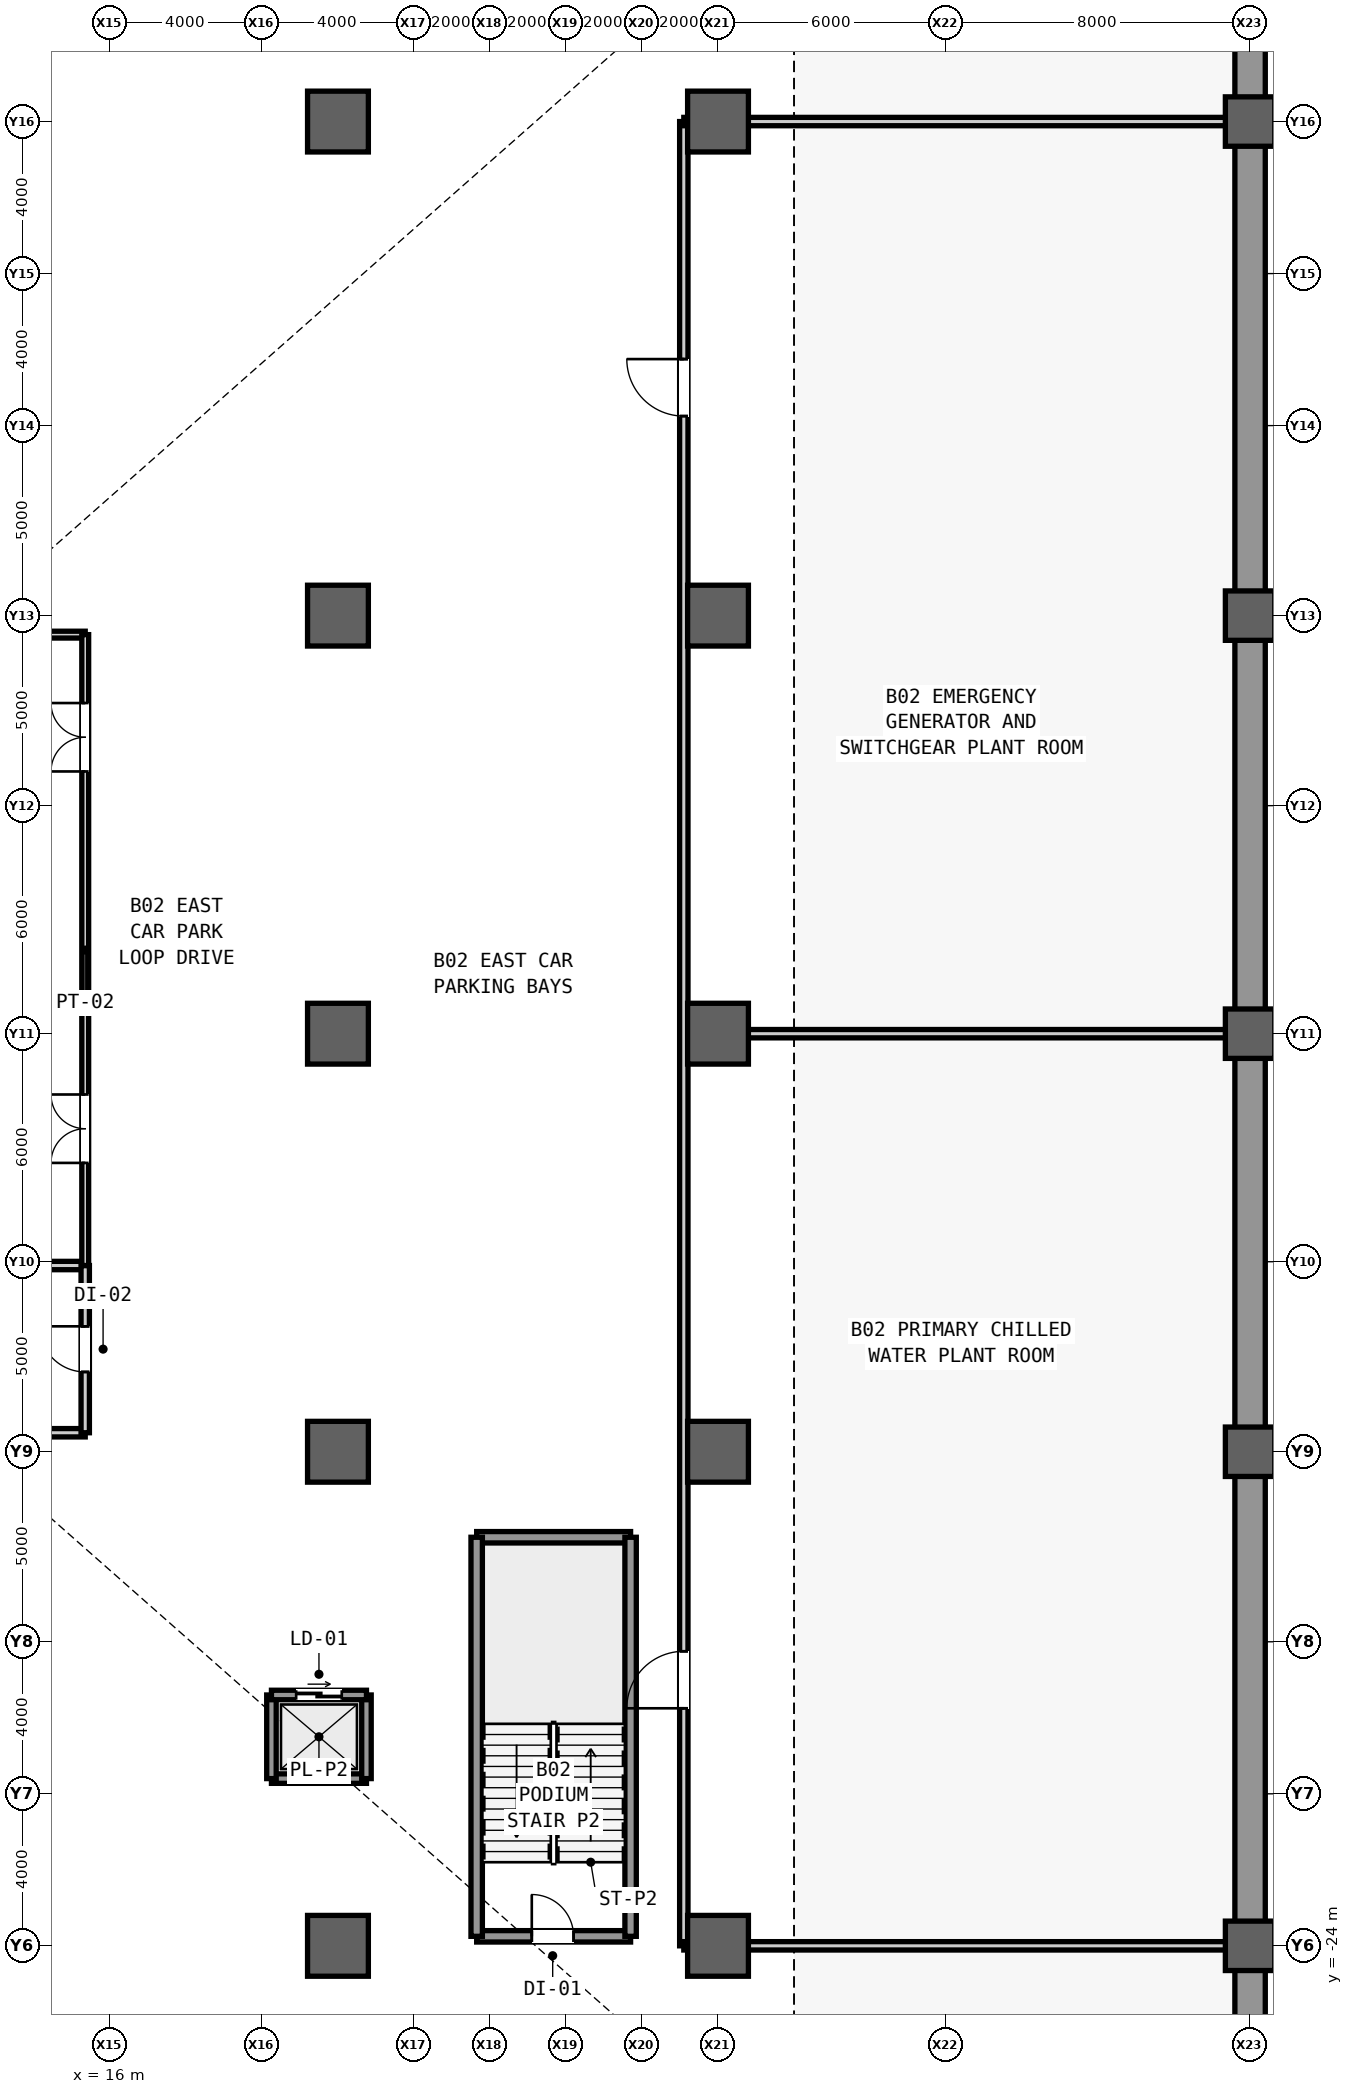
"""IFC4 building model, lengths in metres.
Left out: names, types, materials, properties, quantities, classifications, styles, units other than length and angle.
Written with IfcOpenShell. Run it as: python <this file> out.ifc"""

import sys

from ifc_helpers import new_model, si_unit, direction, frame, frame_2d, origin, origin_2d, place, context, subcontext, project, spatial, rectangle, extrude, source, transform, mapped, element, fill, save


model = new_model("IFC4")
c1 = context("Model", 3, precision=1e-05, world=origin(), true_north=direction((0.0, 1.0)))
c2 = subcontext(c1, "Body", "Model", "MODEL_VIEW")
j1 = project(units=[si_unit("LENGTHUNIT", "METRE"), si_unit("PLANEANGLEUNIT", "RADIAN")], contexts=[c1])
p1 = place(None, origin())
s1 = spatial("IfcSite", under=j1, at=p1, CompositionType="ELEMENT")
p2 = place(p1, origin())
s2 = spatial("IfcBuilding", under=s1, at=p2, CompositionType="ELEMENT")
p3 = place(p2, frame((0.0, 0.0, -9.6)))
s3 = spatial("IfcBuildingStorey", under=s2, at=p3, CompositionType="ELEMENT", Elevation=-9.6)
m1 = source(origin(), c2, "Body", "SweptSolid", [
    extrude(rectangle(XDim=74.4, YDim=0.8, at=frame_2d((37.2, 0.0))), origin(), (0.0, 0.0, 1.0), 4.48),
])
p4 = place(p3, frame((46.0, -37.2, 0.0), z_axis=(0.0, 0.0, 1.0), x_axis=(0.0, 1.0, 0.0)))
e1 = element("IfcWall", 1, at=p4, inside=s3, PredefinedType="USERDEFINED", context=c2, shape_type="MappedRepresentation", body=[
    mapped(m1, transform((0.0, 0.0, 0.0), scale=1.0)),
])
m2 = source(origin(), c2, "Body", "SweptSolid", [
    extrude(rectangle(XDim=1.6, YDim=1.6, at=origin_2d()), origin(), (0.0, 0.0, 1.0), 4.8),
])
for number, where, z_axis, x_axis in (
    (2, (22.0, -24.0, 0.0), (0.0, 0.0, 1.0), (1.0, 0.0, 0.0)),
    (3, (22.0, -11.0, 0.0), (0.0, 0.0, 1.0), (1.0, 0.0, 0.0)),
    (4, (22.0, 0.0, 0.0), (0.0, 0.0, 1.0), (1.0, 0.0, 0.0)),
    (5, (22.0, 11.0, 0.0), (0.0, 0.0, 1.0), (1.0, 0.0, 0.0)),
    (6, (22.0, 24.0, 0.0), (0.0, 0.0, 1.0), (1.0, 0.0, 0.0)),
    (7, (32.0, -24.0, 0.0), (0.0, 0.0, 1.0), (1.0, 0.0, 0.0)),
    (8, (32.0, -11.0, 0.0), (0.0, 0.0, 1.0), (1.0, 0.0, 0.0)),
    (9, (32.0, 0.0, 0.0), (0.0, 0.0, 1.0), (1.0, 0.0, 0.0)),
    (10, (32.0, 11.0, 0.0), (0.0, 0.0, 1.0), (1.0, 0.0, 0.0)),
    (11, (32.0, 24.0, 0.0), (0.0, 0.0, 1.0), (1.0, 0.0, 0.0)),
):
    element("IfcColumn", number, at=place(p3, frame(where, z_axis=z_axis, x_axis=x_axis)), inside=s3, PredefinedType="COLUMN", context=c2, shape_type="MappedRepresentation", body=[
        mapped(m2, transform((0.0, 0.0, 0.0), scale=1.0)),
    ])
m3 = source(origin(), c2, "Body", "SweptSolid", [
    extrude(rectangle(XDim=1.3, YDim=1.3, at=origin_2d()), origin(), (0.0, 0.0, 1.0), 4.8),
])
for number, where, z_axis, x_axis in (
    (12, (46.0, -24.0, 0.0), (0.0, 0.0, 1.0), (1.0, 0.0, 0.0)),
    (13, (46.0, -11.0, 0.0), (0.0, 0.0, 1.0), (1.0, 0.0, 0.0)),
    (14, (46.0, 0.0, 0.0), (0.0, 0.0, 1.0), (1.0, 0.0, 0.0)),
    (15, (46.0, 11.0, 0.0), (0.0, 0.0, 1.0), (1.0, 0.0, 0.0)),
    (16, (46.0, 24.0, 0.0), (0.0, 0.0, 1.0), (1.0, 0.0, 0.0)),
):
    element("IfcColumn", number, at=place(p3, frame(where, z_axis=z_axis, x_axis=x_axis)), inside=s3, PredefinedType="COLUMN", context=c2, shape_type="MappedRepresentation", body=[
        mapped(m3, transform((0.0, 0.0, 0.0), scale=1.0)),
    ])
m4 = source(origin(), c2, "Body", "SweptSolid", [
    extrude(rectangle(XDim=4.05, YDim=0.22, at=frame_2d((2.025, 0.0))), origin(), (0.0, 0.0, 1.0), 4.48),
])
for number, where, z_axis, x_axis in (
    (17, (11.3, -10.5, 0.0), (0.0, 0.0, 1.0), (1.0, 0.0, 0.0)),
    (18, (11.3, -6.1, 0.0), (0.0, 0.0, 1.0), (1.0, 0.0, 0.0)),
):
    element("IfcWall", number, at=place(p3, frame(where, z_axis=z_axis, x_axis=x_axis)), inside=s3, PredefinedType="PARTITIONING", context=c2, shape_type="MappedRepresentation", body=[
        mapped(m4, transform((0.0, 0.0, 0.0), scale=1.0)),
    ])
m5 = source(origin(), c2, "Body", "SweptSolid", [
    extrude(rectangle(XDim=4.4, YDim=0.22, at=frame_2d((2.2, 0.0))), origin(), (0.0, 0.0, 1.0), 4.48),
])
p5 = place(p3, frame((15.35, -10.5, 0.0), z_axis=(0.0, 0.0, 1.0), x_axis=(0.0, 1.0, 0.0)))
e19 = element("IfcWall", 19, at=p5, inside=s3, PredefinedType="PARTITIONING", context=c2, shape_type="MappedRepresentation", body=[
    mapped(m5, transform((0.0, 0.0, 0.0), scale=1.0)),
])
m6 = source(origin(), c2, "Body", "SweptSolid", [
    extrude(rectangle(XDim=1.2, YDim=2.2, at=frame_2d((0.6, 1.1))), frame((0.0, 0.12, 0.0), z_axis=(0.0, -1.0, 0.0), x_axis=(1.0, 0.0, 0.0)), (0.0, 0.0, 1.0), 0.24),
])
p6 = place(p5, frame((1.6, 0.0, 0.0)))
e20 = element("IfcOpeningElement", 20, at=p6, cuts=e19, PredefinedType="OPENING", context=c2, shape_type="MappedRepresentation", body=[
    mapped(m6, transform((0.0, 0.0, 0.0), scale=1.0)),
])
m7 = source(origin(), c2, "Body", "SweptSolid", [
    extrude(rectangle(XDim=4.05, YDim=0.18, at=frame_2d((2.025, 0.0))), origin(), (0.0, 0.0, 1.0), 4.48),
])
p7 = place(p3, frame((11.3, 10.5, 0.0), z_axis=(0.0, 0.0, 1.0), x_axis=(1.0, 0.0, 0.0)))
e21 = element("IfcWall", 21, at=p7, inside=s3, PredefinedType="PARTITIONING", context=c2, shape_type="MappedRepresentation", body=[
    mapped(m7, transform((0.0, 0.0, 0.0), scale=1.0)),
])
m8 = source(origin(), c2, "Body", "SweptSolid", [
    extrude(rectangle(XDim=16.6, YDim=0.18, at=frame_2d((8.3, 0.0))), origin(), (0.0, 0.0, 1.0), 4.48),
])
p8 = place(p3, frame((15.35, -6.1, 0.0), z_axis=(0.0, 0.0, 1.0), x_axis=(0.0, 1.0, 0.0)))
e22 = element("IfcWall", 22, at=p8, inside=s3, PredefinedType="PARTITIONING", context=c2, shape_type="MappedRepresentation", body=[
    mapped(m8, transform((0.0, 0.0, 0.0), scale=1.0)),
])
m9 = source(origin(), c2, "Body", "SweptSolid", [
    extrude(rectangle(XDim=1.8, YDim=2.25, at=frame_2d((0.9, 1.125))), frame((0.0, 0.1, 0.0), z_axis=(0.0, -1.0, 0.0), x_axis=(1.0, 0.0, 0.0)), (0.0, 0.0, 1.0), 0.2),
])
p9 = place(p8, frame((2.7, 0.0, 0.0)))
e23 = element("IfcOpeningElement", 23, at=p9, cuts=e22, PredefinedType="OPENING", context=c2, shape_type="MappedRepresentation", body=[
    mapped(m9, transform((0.0, 0.0, 0.0), scale=1.0)),
])
p10 = place(p8, frame((13.0, 0.0, 0.0)))
e24 = element("IfcOpeningElement", 24, at=p10, cuts=e22, PredefinedType="OPENING", context=c2, shape_type="MappedRepresentation", body=[
    mapped(m9, transform((0.0, 0.0, 0.0), scale=1.0)),
])
m10 = source(origin(), c2, "Body", "SweptSolid", [
    extrude(rectangle(XDim=4.05, YDim=0.3, at=frame_2d((2.025, 0.0))), origin(), (0.0, 0.0, 1.0), 4.48),
])
p11 = place(p3, frame((25.65, -23.75, 0.0), z_axis=(0.0, 0.0, 1.0), x_axis=(1.0, 0.0, 0.0)))
e25 = element("IfcWall", 25, at=p11, inside=s3, PredefinedType="SHEAR", context=c2, shape_type="MappedRepresentation", body=[
    mapped(m10, transform((0.0, 0.0, 0.0), scale=1.0)),
])
m11 = source(origin(), c2, "Body", "SweptSolid", [
    extrude(rectangle(XDim=1.1, YDim=2.2, at=frame_2d((0.55, 1.1))), frame((0.0, 0.16, 0.0), z_axis=(0.0, -1.0, 0.0), x_axis=(1.0, 0.0, 0.0)), (0.0, 0.0, 1.0), 0.32),
])
p12 = place(p11, frame((1.45, 0.0, 0.0)))
e26 = element("IfcOpeningElement", 26, at=p12, cuts=e25, PredefinedType="OPENING", context=c2, shape_type="MappedRepresentation", body=[
    mapped(m11, transform((0.0, 0.0, 0.0), scale=1.0)),
])
p13 = place(p3, frame((25.65, -13.25, 0.0), z_axis=(0.0, 0.0, 1.0), x_axis=(1.0, 0.0, 0.0)))
e27 = element("IfcWall", 27, at=p13, inside=s3, PredefinedType="SHEAR", context=c2, shape_type="MappedRepresentation", body=[
    mapped(m10, transform((0.0, 0.0, 0.0), scale=1.0)),
])
m12 = source(origin(), c2, "Body", "SweptSolid", [
    extrude(rectangle(XDim=10.5, YDim=0.3, at=frame_2d((5.25, 0.0))), origin(), (0.0, 0.0, 1.0), 4.48),
])
for number, where, z_axis, x_axis in (
    (28, (25.65, -23.75, 0.0), (0.0, 0.0, 1.0), (0.0, 1.0, 0.0)),
    (29, (29.7, -23.75, 0.0), (0.0, 0.0, 1.0), (0.0, 1.0, 0.0)),
):
    element("IfcWall", number, at=place(p3, frame(where, z_axis=z_axis, x_axis=x_axis)), inside=s3, PredefinedType="SHEAR", context=c2, shape_type="MappedRepresentation", body=[
        mapped(m12, transform((0.0, 0.0, 0.0), scale=1.0)),
    ])
m13 = source(origin(), c2, "Body", "SweptSolid", [
    extrude(rectangle(XDim=2.5, YDim=0.25, at=frame_2d((1.25, 0.0))), origin(), (0.0, 0.0, 1.0), 4.48),
])
p14 = place(p3, frame((20.25, -19.6, 0.0), z_axis=(0.0, 0.0, 1.0), x_axis=(1.0, 0.0, 0.0)))
e30 = element("IfcWall", 30, at=p14, inside=s3, PredefinedType="SHEAR", context=c2, shape_type="MappedRepresentation", body=[
    mapped(m13, transform((0.0, 0.0, 0.0), scale=1.0)),
])
m14 = source(origin(), c2, "Body", "SweptSolid", [
    extrude(rectangle(XDim=2.2, YDim=0.25, at=frame_2d((1.1, 0.0))), origin(), (0.0, 0.0, 1.0), 4.48),
])
for number, where, z_axis, x_axis in (
    (31, (20.25, -19.6, 0.0), (0.0, 0.0, 1.0), (0.0, 1.0, 0.0)),
    (32, (22.75, -19.6, 0.0), (0.0, 0.0, 1.0), (0.0, 1.0, 0.0)),
):
    element("IfcWall", number, at=place(p3, frame(where, z_axis=z_axis, x_axis=x_axis)), inside=s3, PredefinedType="SHEAR", context=c2, shape_type="MappedRepresentation", body=[
        mapped(m14, transform((0.0, 0.0, 0.0), scale=1.0)),
    ])
p15 = place(p3, frame((20.25, -17.4, 0.0), z_axis=(0.0, 0.0, 1.0), x_axis=(1.0, 0.0, 0.0)))
e33 = element("IfcWall", 33, at=p15, inside=s3, PredefinedType="SHEAR", context=c2, shape_type="MappedRepresentation", body=[
    mapped(m13, transform((0.0, 0.0, 0.0), scale=1.0)),
])
m15 = source(origin(), c2, "Body", "SweptSolid", [
    extrude(rectangle(XDim=1.2, YDim=2.3, at=frame_2d((0.6, 1.15))), frame((0.0, 0.135, 0.0), z_axis=(0.0, -1.0, 0.0), x_axis=(1.0, 0.0, 0.0)), (0.0, 0.0, 1.0), 0.27),
])
p16 = place(p15, frame((0.65, 0.0, 0.0)))
e34 = element("IfcOpeningElement", 34, at=p16, cuts=e33, PredefinedType="OPENING", context=c2, shape_type="MappedRepresentation", body=[
    mapped(m15, transform((0.0, 0.0, 0.0), scale=1.0)),
])
m16 = source(origin(), c2, "Body", "SweptSolid", [
    extrude(rectangle(XDim=14.7, YDim=0.22, at=frame_2d((7.35, 0.0))), origin(), (0.0, 0.0, 1.0), 2.68),
])
p17 = place(p3, frame((31.1, 0.0, 0.0), z_axis=(0.0, 0.0, 1.0), x_axis=(1.0, 0.0, 0.0)))
e35 = element("IfcWall", 35, at=p17, inside=s3, PredefinedType="PARTITIONING", context=c2, shape_type="MappedRepresentation", body=[
    mapped(m16, transform((0.0, 0.0, 0.0), scale=1.0)),
])
m17 = source(origin(), c2, "Body", "SweptSolid", [
    extrude(rectangle(XDim=48.0, YDim=0.22, at=frame_2d((24.0, 0.0))), origin(), (0.0, 0.0, 1.0), 4.48),
])
p18 = place(p3, frame((31.1, -24.0, 0.0), z_axis=(0.0, 0.0, 1.0), x_axis=(0.0, 1.0, 0.0)))
e36 = element("IfcWall", 36, at=p18, inside=s3, PredefinedType="PARTITIONING", context=c2, shape_type="MappedRepresentation", body=[
    mapped(m17, transform((0.0, 0.0, 0.0), scale=1.0)),
])
m18 = source(origin(), c2, "Body", "SweptSolid", [
    extrude(rectangle(XDim=1.5, YDim=2.3, at=frame_2d((0.75, 1.15))), frame((0.0, 0.12, 0.0), z_axis=(0.0, -1.0, 0.0), x_axis=(1.0, 0.0, 0.0)), (0.0, 0.0, 1.0), 0.24),
])
p19 = place(p18, frame((6.25, 0.0, 0.0)))
e37 = element("IfcOpeningElement", 37, at=p19, cuts=e36, PredefinedType="OPENING", context=c2, shape_type="MappedRepresentation", body=[
    mapped(m18, transform((0.0, 0.0, 0.0), scale=1.0)),
])
p20 = place(p18, frame((40.25, 0.0, 0.0)))
e38 = element("IfcOpeningElement", 38, at=p20, cuts=e36, PredefinedType="OPENING", context=c2, shape_type="MappedRepresentation", body=[
    mapped(m18, transform((0.0, 0.0, 0.0), scale=1.0)),
])
m19 = source(origin(), c2, "Body", "SweptSolid", [
    extrude(rectangle(XDim=14.7, YDim=0.22, at=frame_2d((7.35, 0.0))), origin(), (0.0, 0.0, 1.0), 3.444),
])
for number, where, z_axis, x_axis in (
    (39, (31.1, -24.0, 0.0), (0.0, 0.0, 1.0), (1.0, 0.0, 0.0)),
    (40, (31.1, 24.0, 0.0), (0.0, 0.0, 1.0), (1.0, 0.0, 0.0)),
):
    element("IfcWall", number, at=place(p3, frame(where, z_axis=z_axis, x_axis=x_axis)), inside=s3, PredefinedType="PARTITIONING", context=c2, shape_type="MappedRepresentation", body=[
        mapped(m19, transform((0.0, 0.0, 0.0), scale=1.0)),
    ])
m20 = source(origin(), c2, "Body", "SweptSolid", [
    extrude(rectangle(XDim=1.2, YDim=2.2, at=frame_2d((0.6, 1.1))), frame((0.0, 0.025, 0.0), z_axis=(0.0, -1.0, 0.0), x_axis=(1.0, 0.0, 0.0)), (0.0, 0.0, 1.0), 0.05),
])
p21 = place(p6, origin())
e41 = element("IfcDoor", 41, at=p21, inside=s3, OperationType="SINGLE_SWING_RIGHT", PredefinedType="DOOR", context=c2, shape_type="MappedRepresentation", body=[
    mapped(m20, transform((0.0, 0.0, 0.0), scale=1.0)),
])
fill(e20, e41)
m21 = source(origin(), c2, "Body", "SweptSolid", [
    extrude(rectangle(XDim=1.8, YDim=2.25, at=frame_2d((0.9, 1.125))), frame((0.0, 0.025, 0.0), z_axis=(0.0, -1.0, 0.0), x_axis=(1.0, 0.0, 0.0)), (0.0, 0.0, 1.0), 0.05),
])
p22 = place(p9, origin())
e42 = element("IfcDoor", 42, at=p22, inside=s3, OperationType="SINGLE_SWING_RIGHT", PredefinedType="DOOR", context=c2, shape_type="MappedRepresentation", body=[
    mapped(m21, transform((0.0, 0.0, 0.0), scale=1.0)),
])
fill(e23, e42)
p23 = place(p10, origin())
e43 = element("IfcDoor", 43, at=p23, inside=s3, OperationType="SINGLE_SWING_LEFT", PredefinedType="DOOR", context=c2, shape_type="MappedRepresentation", body=[
    mapped(m21, transform((0.0, 0.0, 0.0), scale=1.0)),
])
fill(e24, e43)
m22 = source(origin(), c2, "Body", "SweptSolid", [
    extrude(rectangle(XDim=1.1, YDim=2.2, at=frame_2d((0.55, 1.1))), frame((0.0, 0.025, 0.0), z_axis=(0.0, -1.0, 0.0), x_axis=(1.0, 0.0, 0.0)), (0.0, 0.0, 1.0), 0.05),
])
p24 = place(p12, origin())
e44 = element("IfcDoor", 44, at=p24, inside=s3, OperationType="SINGLE_SWING_LEFT", PredefinedType="DOOR", context=c2, shape_type="MappedRepresentation", body=[
    mapped(m22, transform((0.0, 0.0, 0.0), scale=1.0)),
])
fill(e26, e44)
m23 = source(origin(), c2, "Body", "SweptSolid", [
    extrude(rectangle(XDim=1.5, YDim=2.3, at=frame_2d((0.75, 1.15))), frame((0.0, 0.025, 0.0), z_axis=(0.0, -1.0, 0.0), x_axis=(1.0, 0.0, 0.0)), (0.0, 0.0, 1.0), 0.05),
])
p25 = place(p19, origin())
e45 = element("IfcDoor", 45, at=p25, inside=s3, OperationType="SINGLE_SWING_LEFT", PredefinedType="DOOR", context=c2, shape_type="MappedRepresentation", body=[
    mapped(m23, transform((0.0, 0.0, 0.0), scale=1.0)),
])
fill(e37, e45)
p26 = place(p20, origin())
e46 = element("IfcDoor", 46, at=p26, inside=s3, OperationType="SINGLE_SWING_RIGHT", PredefinedType="DOOR", context=c2, shape_type="MappedRepresentation", body=[
    mapped(m23, transform((0.0, 0.0, 0.0), scale=1.0)),
])
fill(e38, e46)
m24 = source(origin(), c2, "Body", "SweptSolid", [
    extrude(rectangle(XDim=1.2, YDim=2.3, at=frame_2d((0.6, 1.15))), frame((0.0, 0.025, 0.0), z_axis=(0.0, -1.0, 0.0), x_axis=(1.0, 0.0, 0.0)), (0.0, 0.0, 1.0), 0.05),
])
p27 = place(p16, origin())
e47 = element("IfcDoor", 47, at=p27, inside=s3, OperationType="SLIDING_TO_LEFT", PredefinedType="DOOR", context=c2, shape_type="MappedRepresentation", body=[
    mapped(m24, transform((0.0, 0.0, 0.0), scale=1.0)),
])
fill(e34, e47)
save(model, sys.argv[1])
